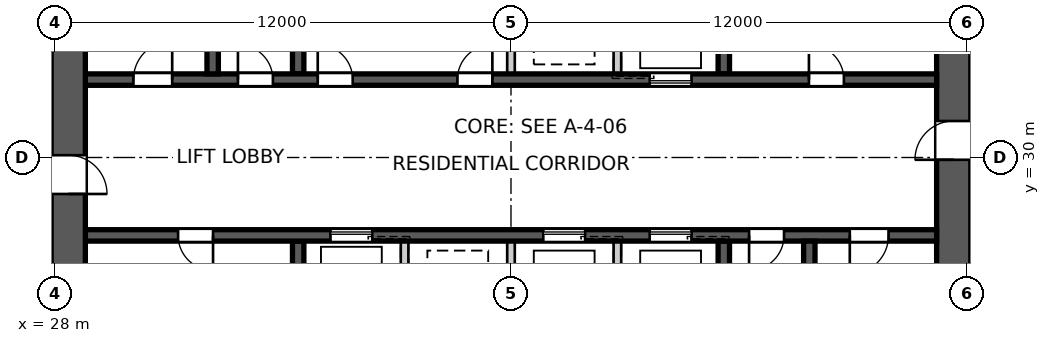
"""IFC4 building model, lengths in metres.
Left out: names, types, materials, properties, quantities, classifications, styles, units other than length and angle.
Written with IfcOpenShell. Run it as: python <this file> out.ifc"""

import sys

from ifc_helpers import new_model, si_unit, direction, frame, frame_2d, origin, place, context, subcontext, project, spatial, polyline, rectangle, outline, extrude, element, fill, save


model = new_model("IFC4")
c1 = context("Model", 3, precision=1e-05, world=origin(), true_north=direction((0.0, 1.0)))
c2 = subcontext(c1, "Body", "Model", "MODEL_VIEW")
j1 = project(units=[si_unit("LENGTHUNIT", "METRE"), si_unit("PLANEANGLEUNIT", "RADIAN")], contexts=[c1])
p1 = place(None, origin())
s1 = spatial("IfcSite", under=j1, at=p1, CompositionType="ELEMENT")
p2 = place(p1, origin())
s2 = spatial("IfcBuilding", under=s1, at=p2, CompositionType="ELEMENT")
p3 = place(p2, frame((0.0, 0.0, 199.8)))
s3 = spatial("IfcBuildingStorey", under=s2, at=p3, CompositionType="ELEMENT", Elevation=199.8)
p4 = place(p3, frame((51.65, 18.8, 0.0), z_axis=(0.0, 0.0, 1.0), x_axis=(0.0, 1.0, 0.0)))
e1 = element("IfcWall", 1, at=p4, inside=s3, PredefinedType="SHEAR", context=c2, shape_type="SweptSolid", body=[
    extrude(outline(polyline([(0.0, -0.45), (22.4, -0.45), (22.4, -0.025), (22.85, -0.025), (22.85, 0.025), (22.4, 0.025), (22.4, 0.45), (0.0, 0.45), (0.0, 0.025), (-0.45, 0.025), (-0.45, -0.025), (0.0, -0.025), (0.0, -0.45)])), origin(), (0.0, 0.0, 1.0), 3.4),
])
p5 = place(p4, frame((11.14, 0.0, 0.0)))
e2 = element("IfcOpeningElement", 2, at=p5, cuts=e1, PredefinedType="OPENING", context=c2, shape_type="SweptSolid", body=[
    extrude(rectangle(XDim=1.02, YDim=2.4, at=frame_2d((0.51, 1.2))), frame((0.0, 0.46, 0.0), z_axis=(0.0, -1.0, 0.0), x_axis=(1.0, 0.0, 0.0)), (0.0, 0.0, 1.0), 0.92),
])
p6 = place(p3, frame((28.35, 41.2, 0.0), z_axis=(0.0, 0.0, 1.0), x_axis=(0.0, -1.0, 0.0)))
e3 = element("IfcWall", 3, at=p6, inside=s3, PredefinedType="SHEAR", context=c2, shape_type="SweptSolid", body=[
    extrude(outline(polyline([(0.0, -0.45), (22.4, -0.45), (22.4, -0.025), (22.85, -0.025), (22.85, 0.025), (22.4, 0.025), (22.4, 0.45), (0.0, 0.45), (0.0, 0.025), (-0.45, 0.025), (-0.45, -0.025), (0.0, -0.025), (0.0, -0.45)])), origin(), (0.0, 0.0, 1.0), 3.4),
])
p7 = place(p6, frame((11.14, 0.0, 0.0)))
e4 = element("IfcOpeningElement", 4, at=p7, cuts=e3, PredefinedType="OPENING", context=c2, shape_type="SweptSolid", body=[
    extrude(rectangle(XDim=1.02, YDim=2.4, at=frame_2d((0.51, 1.2))), frame((0.0, 0.46, 0.0), z_axis=(0.0, -1.0, 0.0), x_axis=(1.0, 0.0, 0.0)), (0.0, 0.0, 1.0), 0.92),
])
p8 = place(p3, frame((28.8, 32.05, 0.0), z_axis=(0.0, 0.0, 1.0), x_axis=(1.0, 0.0, 0.0)))
e5 = element("IfcWall", 5, at=p8, inside=s3, PredefinedType="SHEAR", context=c2, shape_type="SweptSolid", body=[
    extrude(rectangle(XDim=22.4, YDim=0.3, at=frame_2d((11.2, 0.0))), origin(), (0.0, 0.0, 1.0), 3.4),
])
p9 = place(p8, frame((19.04, 0.0, 0.0)))
e6 = element("IfcOpeningElement", 6, at=p9, cuts=e5, PredefinedType="OPENING", context=c2, shape_type="SweptSolid", body=[
    extrude(rectangle(XDim=0.92, YDim=2.1, at=frame_2d((0.46, 1.05))), frame((0.0, 0.16, 0.0), z_axis=(0.0, -1.0, 0.0), x_axis=(1.0, 0.0, 0.0)), (0.0, 0.0, 1.0), 0.32),
])
p10 = place(p8, frame((1.265, 0.0, 0.0)))
e7 = element("IfcOpeningElement", 7, at=p10, cuts=e5, PredefinedType="OPENING", context=c2, shape_type="SweptSolid", body=[
    extrude(rectangle(XDim=1.02, YDim=2.1, at=frame_2d((0.51, 1.05))), frame((0.0, 0.16, 0.0), z_axis=(0.0, -1.0, 0.0), x_axis=(1.0, 0.0, 0.0)), (0.0, 0.0, 1.0), 0.32),
])
p11 = place(p8, frame((4.015, 0.0, 0.0)))
e8 = element("IfcOpeningElement", 8, at=p11, cuts=e5, PredefinedType="OPENING", context=c2, shape_type="SweptSolid", body=[
    extrude(rectangle(XDim=0.92, YDim=2.1, at=frame_2d((0.46, 1.05))), frame((0.0, 0.16, 0.0), z_axis=(0.0, -1.0, 0.0), x_axis=(1.0, 0.0, 0.0)), (0.0, 0.0, 1.0), 0.32),
])
p12 = place(p8, frame((6.115, 0.0, 0.0)))
e9 = element("IfcOpeningElement", 9, at=p12, cuts=e5, PredefinedType="OPENING", context=c2, shape_type="SweptSolid", body=[
    extrude(rectangle(XDim=0.92, YDim=2.1, at=frame_2d((0.46, 1.05))), frame((0.0, 0.16, 0.0), z_axis=(0.0, -1.0, 0.0), x_axis=(1.0, 0.0, 0.0)), (0.0, 0.0, 1.0), 0.32),
])
p13 = place(p8, frame((9.79, 0.0, 0.0)))
e10 = element("IfcOpeningElement", 10, at=p13, cuts=e5, PredefinedType="OPENING", context=c2, shape_type="SweptSolid", body=[
    extrude(rectangle(XDim=0.92, YDim=2.1, at=frame_2d((0.46, 1.05))), frame((0.0, 0.16, 0.0), z_axis=(0.0, -1.0, 0.0), x_axis=(1.0, 0.0, 0.0)), (0.0, 0.0, 1.0), 0.32),
])
p14 = place(p8, frame((14.85, 0.0, 0.0)))
e11 = element("IfcOpeningElement", 11, at=p14, cuts=e5, PredefinedType="OPENING", context=c2, shape_type="SweptSolid", body=[
    extrude(rectangle(XDim=1.1, YDim=2.1, at=frame_2d((0.55, 1.05))), frame((0.0, 0.16, 0.0), z_axis=(0.0, -1.0, 0.0), x_axis=(1.0, 0.0, 0.0)), (0.0, 0.0, 1.0), 0.32),
])
p15 = place(p3, frame((51.2, 27.95, 0.0), z_axis=(0.0, 0.0, 1.0), x_axis=(-1.0, 0.0, 0.0)))
e12 = element("IfcWall", 12, at=p15, inside=s3, PredefinedType="SHEAR", context=c2, shape_type="SweptSolid", body=[
    extrude(rectangle(XDim=22.4, YDim=0.3, at=frame_2d((11.2, 0.0))), origin(), (0.0, 0.0, 1.0), 3.4),
])
p16 = place(p15, frame((19.04, 0.0, 0.0)))
e13 = element("IfcOpeningElement", 13, at=p16, cuts=e12, PredefinedType="OPENING", context=c2, shape_type="SweptSolid", body=[
    extrude(rectangle(XDim=0.92, YDim=2.1, at=frame_2d((0.46, 1.05))), frame((0.0, 0.16, 0.0), z_axis=(0.0, -1.0, 0.0), x_axis=(1.0, 0.0, 0.0)), (0.0, 0.0, 1.0), 0.32),
])
p17 = place(p15, frame((1.265, 0.0, 0.0)))
e14 = element("IfcOpeningElement", 14, at=p17, cuts=e12, PredefinedType="OPENING", context=c2, shape_type="SweptSolid", body=[
    extrude(rectangle(XDim=1.02, YDim=2.1, at=frame_2d((0.51, 1.05))), frame((0.0, 0.16, 0.0), z_axis=(0.0, -1.0, 0.0), x_axis=(1.0, 0.0, 0.0)), (0.0, 0.0, 1.0), 0.32),
])
p18 = place(p15, frame((4.015, 0.0, 0.0)))
e15 = element("IfcOpeningElement", 15, at=p18, cuts=e12, PredefinedType="OPENING", context=c2, shape_type="SweptSolid", body=[
    extrude(rectangle(XDim=0.92, YDim=2.1, at=frame_2d((0.46, 1.05))), frame((0.0, 0.16, 0.0), z_axis=(0.0, -1.0, 0.0), x_axis=(1.0, 0.0, 0.0)), (0.0, 0.0, 1.0), 0.32),
])
p19 = place(p15, frame((6.45, 0.0, 0.0)))
e16 = element("IfcOpeningElement", 16, at=p19, cuts=e12, PredefinedType="OPENING", context=c2, shape_type="SweptSolid", body=[
    extrude(rectangle(XDim=1.1, YDim=2.1, at=frame_2d((0.55, 1.05))), frame((0.0, 0.16, 0.0), z_axis=(0.0, -1.0, 0.0), x_axis=(1.0, 0.0, 0.0)), (0.0, 0.0, 1.0), 0.32),
])
p20 = place(p15, frame((9.25, 0.0, 0.0)))
e17 = element("IfcOpeningElement", 17, at=p20, cuts=e12, PredefinedType="OPENING", context=c2, shape_type="SweptSolid", body=[
    extrude(rectangle(XDim=1.1, YDim=2.1, at=frame_2d((0.55, 1.05))), frame((0.0, 0.16, 0.0), z_axis=(0.0, -1.0, 0.0), x_axis=(1.0, 0.0, 0.0)), (0.0, 0.0, 1.0), 0.32),
])
p21 = place(p15, frame((14.85, 0.0, 0.0)))
e18 = element("IfcOpeningElement", 18, at=p21, cuts=e12, PredefinedType="OPENING", context=c2, shape_type="SweptSolid", body=[
    extrude(rectangle(XDim=1.1, YDim=2.1, at=frame_2d((0.55, 1.05))), frame((0.0, 0.16, 0.0), z_axis=(0.0, -1.0, 0.0), x_axis=(1.0, 0.0, 0.0)), (0.0, 0.0, 1.0), 0.32),
])
for number, where, z_axis, x_axis in (
    (19, (34.4, 32.2, 0.0), (0.0, 0.0, 1.0), (0.0, 1.0, 0.0)),
    (20, (45.6, 27.8, 0.0), (0.0, 0.0, 1.0), (0.0, -1.0, 0.0)),
):
    element("IfcWall", number, at=place(p3, frame(where, z_axis=z_axis, x_axis=x_axis)), inside=s3, PredefinedType="SHEAR", context=c2, shape_type="SweptSolid", body=[
        extrude(rectangle(XDim=2.8, YDim=0.3, at=frame_2d((1.4, 0.0))), origin(), (0.0, 0.0, 1.0), 3.4),
    ])
for number, where, z_axis, x_axis in (
    (21, (42.8, 27.8, 0.0), (0.0, 0.0, 1.0), (0.0, -1.0, 0.0)),
    (22, (40.0, 32.2, 0.0), (0.0, 0.0, 1.0), (0.0, 1.0, 0.0)),
    (23, (40.0, 27.8, 0.0), (0.0, 0.0, 1.0), (0.0, -1.0, 0.0)),
    (24, (42.8, 32.2, 0.0), (0.0, 0.0, 1.0), (0.0, 1.0, 0.0)),
    (25, (37.2, 27.8, 0.0), (0.0, 0.0, 1.0), (0.0, -1.0, 0.0)),
):
    element("IfcWall", number, at=place(p3, frame(where, z_axis=z_axis, x_axis=x_axis)), inside=s3, PredefinedType="SOLIDWALL", context=c2, shape_type="SweptSolid", body=[
        extrude(rectangle(XDim=2.8, YDim=0.2, at=frame_2d((1.4, 0.0))), origin(), (0.0, 0.0, 1.0), 3.4),
    ])
for number, where, z_axis, x_axis in (
    (26, (45.6, 32.2, 0.0), (0.0, 0.0, 1.0), (0.0, 1.0, 0.0)),
    (27, (34.4, 27.8, 0.0), (0.0, 0.0, 1.0), (0.0, -1.0, 0.0)),
):
    element("IfcWall", number, at=place(p3, frame(where, z_axis=z_axis, x_axis=x_axis)), inside=s3, PredefinedType="SHEAR", context=c2, shape_type="SweptSolid", body=[
        extrude(rectangle(XDim=2.8, YDim=0.3, at=frame_2d((1.4, 0.0))), origin(), (0.0, 0.0, 1.0), 3.4),
    ])
for number, where, z_axis, x_axis in (
    (28, (32.15, 32.2, 0.0), (0.0, 0.0, 1.0), (0.0, 1.0, 0.0)),
    (29, (47.85, 27.8, 0.0), (0.0, 0.0, 1.0), (0.0, -1.0, 0.0)),
):
    element("IfcWall", number, at=place(p3, frame(where, z_axis=z_axis, x_axis=x_axis)), inside=s3, PredefinedType="SHEAR", context=c2, shape_type="SweptSolid", body=[
        extrude(rectangle(XDim=7.7, YDim=0.3, at=frame_2d((3.85, 0.0))), origin(), (0.0, 0.0, 1.0), 3.4),
    ])
p22 = place(p9, origin())
e30 = element("IfcDoor", 30, at=p22, inside=s3, OperationType="SINGLE_SWING_LEFT", PredefinedType="DOOR", context=c2, shape_type="SweptSolid", body=[
    extrude(rectangle(XDim=0.92, YDim=2.1, at=frame_2d((0.46, 1.05))), frame((0.0, 0.025, 0.0), z_axis=(0.0, -1.0, 0.0), x_axis=(1.0, 0.0, 0.0)), (0.0, 0.0, 1.0), 0.05),
])
fill(e6, e30)
p23 = place(p16, origin())
e31 = element("IfcDoor", 31, at=p23, inside=s3, OperationType="SINGLE_SWING_LEFT", PredefinedType="DOOR", context=c2, shape_type="SweptSolid", body=[
    extrude(rectangle(XDim=0.92, YDim=2.1, at=frame_2d((0.46, 1.05))), frame((0.0, 0.025, 0.0), z_axis=(0.0, -1.0, 0.0), x_axis=(1.0, 0.0, 0.0)), (0.0, 0.0, 1.0), 0.05),
])
fill(e13, e31)
p24 = place(p17, origin())
e32 = element("IfcDoor", 32, at=p24, inside=s3, OperationType="SINGLE_SWING_RIGHT", PredefinedType="DOOR", context=c2, shape_type="SweptSolid", body=[
    extrude(rectangle(XDim=1.02, YDim=2.1, at=frame_2d((0.51, 1.05))), frame((0.0, 0.025, 0.0), z_axis=(0.0, -1.0, 0.0), x_axis=(1.0, 0.0, 0.0)), (0.0, 0.0, 1.0), 0.05),
])
fill(e14, e32)
p25 = place(p10, origin())
e33 = element("IfcDoor", 33, at=p25, inside=s3, OperationType="SINGLE_SWING_RIGHT", PredefinedType="DOOR", context=c2, shape_type="SweptSolid", body=[
    extrude(rectangle(XDim=1.02, YDim=2.1, at=frame_2d((0.51, 1.05))), frame((0.0, 0.025, 0.0), z_axis=(0.0, -1.0, 0.0), x_axis=(1.0, 0.0, 0.0)), (0.0, 0.0, 1.0), 0.05),
])
fill(e7, e33)
p26 = place(p11, origin())
e34 = element("IfcDoor", 34, at=p26, inside=s3, OperationType="SINGLE_SWING_LEFT", PredefinedType="DOOR", context=c2, shape_type="SweptSolid", body=[
    extrude(rectangle(XDim=0.92, YDim=2.1, at=frame_2d((0.46, 1.05))), frame((0.0, 0.025, 0.0), z_axis=(0.0, -1.0, 0.0), x_axis=(1.0, 0.0, 0.0)), (0.0, 0.0, 1.0), 0.05),
])
fill(e8, e34)
p27 = place(p18, origin())
e35 = element("IfcDoor", 35, at=p27, inside=s3, OperationType="SINGLE_SWING_RIGHT", PredefinedType="DOOR", context=c2, shape_type="SweptSolid", body=[
    extrude(rectangle(XDim=0.92, YDim=2.1, at=frame_2d((0.46, 1.05))), frame((0.0, 0.025, 0.0), z_axis=(0.0, -1.0, 0.0), x_axis=(1.0, 0.0, 0.0)), (0.0, 0.0, 1.0), 0.05),
])
fill(e15, e35)
p28 = place(p12, origin())
e36 = element("IfcDoor", 36, at=p28, inside=s3, OperationType="SINGLE_SWING_LEFT", PredefinedType="DOOR", context=c2, shape_type="SweptSolid", body=[
    extrude(rectangle(XDim=0.92, YDim=2.1, at=frame_2d((0.46, 1.05))), frame((0.0, 0.025, 0.0), z_axis=(0.0, -1.0, 0.0), x_axis=(1.0, 0.0, 0.0)), (0.0, 0.0, 1.0), 0.05),
])
fill(e9, e36)
p29 = place(p13, origin())
e37 = element("IfcDoor", 37, at=p29, inside=s3, OperationType="SINGLE_SWING_RIGHT", PredefinedType="DOOR", context=c2, shape_type="SweptSolid", body=[
    extrude(rectangle(XDim=0.92, YDim=2.1, at=frame_2d((0.46, 1.05))), frame((0.0, 0.025, 0.0), z_axis=(0.0, -1.0, 0.0), x_axis=(1.0, 0.0, 0.0)), (0.0, 0.0, 1.0), 0.05),
])
fill(e10, e37)
p30 = place(p5, origin())
e38 = element("IfcDoor", 38, at=p30, inside=s3, OperationType="SINGLE_SWING_LEFT", PredefinedType="DOOR", context=c2, shape_type="SweptSolid", body=[
    extrude(rectangle(XDim=1.02, YDim=2.4, at=frame_2d((0.51, 1.2))), frame((0.0, 0.025, 0.0), z_axis=(0.0, -1.0, 0.0), x_axis=(1.0, 0.0, 0.0)), (0.0, 0.0, 1.0), 0.05),
])
fill(e2, e38)
p31 = place(p7, origin())
e39 = element("IfcDoor", 39, at=p31, inside=s3, OperationType="SINGLE_SWING_RIGHT", PredefinedType="DOOR", context=c2, shape_type="SweptSolid", body=[
    extrude(rectangle(XDim=1.02, YDim=2.4, at=frame_2d((0.51, 1.2))), frame((0.0, 0.025, 0.0), z_axis=(0.0, -1.0, 0.0), x_axis=(1.0, 0.0, 0.0)), (0.0, 0.0, 1.0), 0.05),
])
fill(e4, e39)
p32 = place(p19, origin())
e40 = element("IfcDoor", 40, at=p32, inside=s3, OperationType="SLIDING_TO_LEFT", PredefinedType="DOOR", context=c2, shape_type="SweptSolid", body=[
    extrude(rectangle(XDim=1.1, YDim=2.1, at=frame_2d((0.55, 1.05))), frame((0.0, 0.025, 0.0), z_axis=(0.0, -1.0, 0.0), x_axis=(1.0, 0.0, 0.0)), (0.0, 0.0, 1.0), 0.05),
])
fill(e16, e40)
p33 = place(p20, origin())
e41 = element("IfcDoor", 41, at=p33, inside=s3, OperationType="SLIDING_TO_LEFT", PredefinedType="DOOR", context=c2, shape_type="SweptSolid", body=[
    extrude(rectangle(XDim=1.1, YDim=2.1, at=frame_2d((0.55, 1.05))), frame((0.0, 0.025, 0.0), z_axis=(0.0, -1.0, 0.0), x_axis=(1.0, 0.0, 0.0)), (0.0, 0.0, 1.0), 0.05),
])
fill(e17, e41)
p34 = place(p14, origin())
e42 = element("IfcDoor", 42, at=p34, inside=s3, OperationType="SLIDING_TO_LEFT", PredefinedType="DOOR", context=c2, shape_type="SweptSolid", body=[
    extrude(rectangle(XDim=1.1, YDim=2.1, at=frame_2d((0.55, 1.05))), frame((0.0, 0.025, 0.0), z_axis=(0.0, -1.0, 0.0), x_axis=(1.0, 0.0, 0.0)), (0.0, 0.0, 1.0), 0.05),
])
fill(e11, e42)
p35 = place(p21, origin())
e43 = element("IfcDoor", 43, at=p35, inside=s3, OperationType="SLIDING_TO_LEFT", PredefinedType="DOOR", context=c2, shape_type="SweptSolid", body=[
    extrude(rectangle(XDim=1.1, YDim=2.1, at=frame_2d((0.55, 1.05))), frame((0.0, 0.025, 0.0), z_axis=(0.0, -1.0, 0.0), x_axis=(1.0, 0.0, 0.0)), (0.0, 0.0, 1.0), 0.05),
])
fill(e18, e43)
save(model, sys.argv[1])
